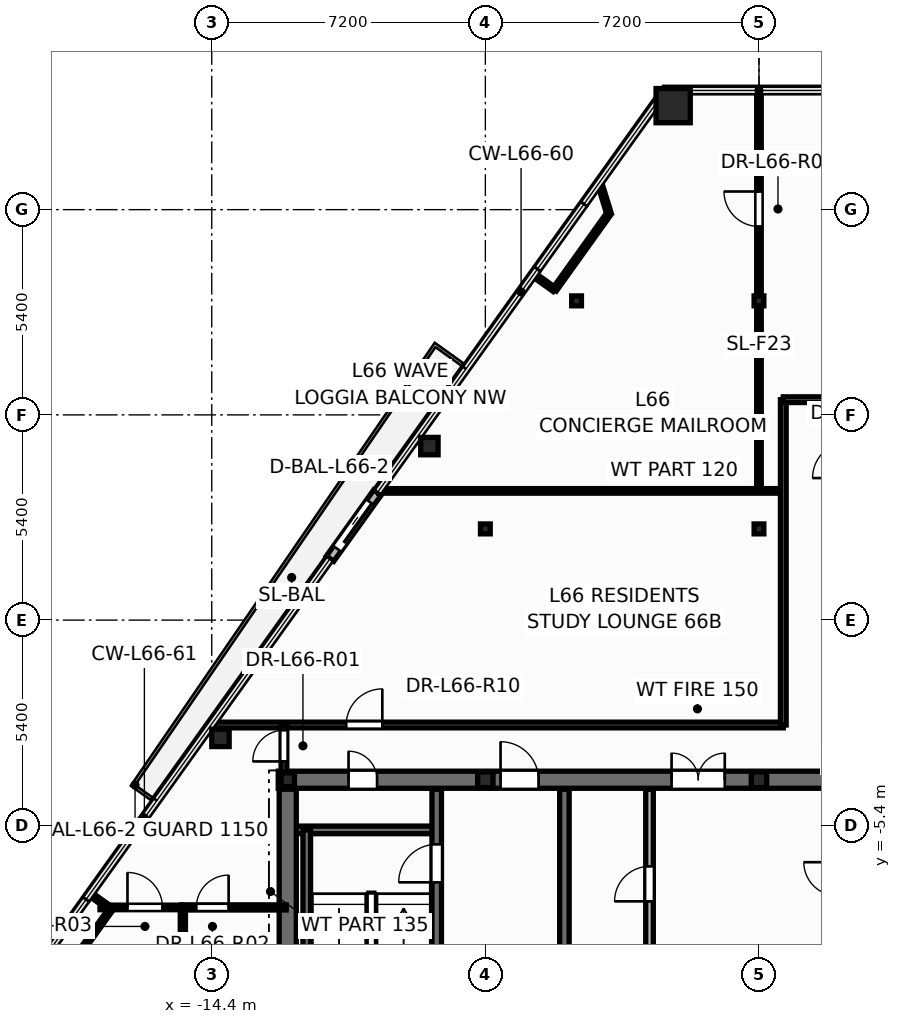
"""IFC4 building model, lengths in metres.
Left out: names, types, materials, properties, quantities, classifications, styles, units other than length and angle.
Written with IfcOpenShell. Run it as: python <this file> out.ifc"""

import sys

from ifc_helpers import new_model, si_unit, direction, frame, frame_2d, origin, origin_2d, place, context, subcontext, project, spatial, rectangle, hollow_rectangle, hollow_circle, i_section, extrude, element, fill, save


model = new_model("IFC4")
c1 = context("Model", 3, precision=1e-05, world=origin(), true_north=direction((0.0, 1.0)))
c2 = subcontext(c1, "Body", "Model", "MODEL_VIEW")
j1 = project(units=[si_unit("LENGTHUNIT", "METRE"), si_unit("PLANEANGLEUNIT", "RADIAN")], contexts=[c1])
p1 = place(None, origin())
s1 = spatial("IfcSite", under=j1, at=p1, CompositionType="ELEMENT")
p2 = place(p1, origin())
s2 = spatial("IfcBuilding", under=s1, at=p2, CompositionType="ELEMENT")
p3 = place(p2, frame((0.0, 0.0, 252.6)))
s3 = spatial("IfcBuildingStorey", under=s2, at=p3, CompositionType="ELEMENT", Elevation=252.6)
p4 = place(p3, frame((-2.258, 13.537, 0.0), z_axis=(0.0, 0.0, 1.0), x_axis=(1.0, 0.0, 0.0)))
e1 = element("IfcColumn", 1, at=p4, inside=s3, PredefinedType="COLUMN", context=c2, shape_type="SweptSolid", body=[
    extrude(hollow_rectangle(XDim=0.9, YDim=0.9, WallThickness=0.04, at=origin_2d()), origin(), (0.0, 0.0, 1.0), 3.6),
])
for number, where, z_axis, x_axis in (
    (2, (-8.673, 4.579, 0.0), (0.0, 0.0, 1.0), (1.0, 0.0, 0.0)),
    (3, (-14.171, -3.099, 0.0), (0.0, 0.0, 1.0), (1.0, 0.0, 0.0)),
):
    element("IfcColumn", number, at=place(p3, frame(where, z_axis=z_axis, x_axis=x_axis)), inside=s3, PredefinedType="COLUMN", context=c2, shape_type="SweptSolid", body=[
        extrude(hollow_circle(Radius=0.229, WallThickness=0.016, at=origin_2d()), origin(), (0.0, 0.0, 1.0), 3.6),
    ])
p5 = place(p3, frame((-12.4, -4.2, 0.0), z_axis=(0.0, 0.0, 1.0), x_axis=(1.0, 0.0, 0.0)))
e4 = element("IfcColumn", 4, at=p5, inside=s3, PredefinedType="COLUMN", context=c2, shape_type="SweptSolid", body=[
    extrude(i_section(OverallWidth=0.352, OverallDepth=0.359, WebThickness=0.018, FlangeThickness=0.026, at=origin_2d()), origin(), (0.0, 0.0, 1.0), 3.6),
])
for number, where, z_axis, x_axis in (
    (5, (-7.2, -4.2, 0.0), (0.0, 0.0, 1.0), (1.0, 0.0, 0.0)),
    (6, (0.0, -4.2, 0.0), (0.0, 0.0, 1.0), (1.0, 0.0, 0.0)),
):
    element("IfcColumn", number, at=place(p3, frame(where, z_axis=z_axis, x_axis=x_axis)), inside=s3, PredefinedType="PILASTER", context=c2, shape_type="SweptSolid", body=[
        extrude(i_section(OverallWidth=0.405, OverallDepth=0.414, WebThickness=0.022, FlangeThickness=0.032, at=origin_2d()), origin(), (0.0, 0.0, 1.0), 3.6),
    ])
for number, where, z_axis, x_axis in (
    (7, (-7.2, 2.4, 0.0), (0.0, 0.0, 1.0), (1.0, 0.0, 0.0)),
    (8, (0.0, 2.4, 0.0), (0.0, 0.0, 1.0), (1.0, 0.0, 0.0)),
    (9, (-4.8, 8.4, 0.0), (0.0, 0.0, 1.0), (1.0, 0.0, 0.0)),
    (10, (0.0, 8.4, 0.0), (0.0, 0.0, 1.0), (1.0, 0.0, 0.0)),
):
    element("IfcColumn", number, at=place(p3, frame(where, z_axis=z_axis, x_axis=x_axis)), inside=s3, PredefinedType="COLUMN", context=c2, shape_type="SweptSolid", body=[
        extrude(i_section(OverallWidth=0.256, OverallDepth=0.26, WebThickness=0.01, FlangeThickness=0.017, at=origin_2d()), origin(), (0.0, 0.0, 1.0), 3.6),
    ])
p6 = place(p3, frame((-10.039, 3.357, -0.015), z_axis=(0.0, 0.0, 1.0), x_axis=(-0.58216589686, -0.813070026832, 0.0)))
e11 = element("IfcWall", 11, at=p6, inside=s3, PredefinedType="STANDARD", context=c2, shape_type="SweptSolid", body=[
    extrude(rectangle(XDim=2.14, YDim=0.24, at=frame_2d((1.07, 0.0))), origin(), (0.0, 0.0, 1.0), 2.878),
])
p7 = place(p6, frame((0.32, 0.0, 0.015)))
e12 = element("IfcOpeningElement", 12, at=p7, cuts=e11, PredefinedType="OPENING", context=c2, shape_type="SweptSolid", body=[
    extrude(rectangle(XDim=1.506, YDim=2.204, at=frame_2d((0.75, 1.102))), frame((0.0, 0.13, 0.0), z_axis=(0.0, -1.0, 0.0), x_axis=(1.0, 0.0, 0.0)), (0.0, 0.0, 1.0), 0.26),
])
p8 = place(p3, frame((-12.65, -4.2, 0.0), z_axis=(0.0, 0.0, 1.0), x_axis=(1.0, 0.0, 0.0)))
e13 = element("IfcWall", 13, at=p8, inside=s3, PredefinedType="SHEAR", context=c2, shape_type="SweptSolid", body=[
    extrude(rectangle(XDim=25.3, YDim=0.45, at=frame_2d((12.65, 0.0))), origin(), (0.0, 0.0, 1.0), 3.6),
])
p9 = place(p8, frame((1.85, 0.0, 0.0)))
e14 = element("IfcOpeningElement", 14, at=p9, cuts=e13, PredefinedType="OPENING", context=c2, shape_type="SweptSolid", body=[
    extrude(rectangle(XDim=0.756, YDim=2.054, at=frame_2d((0.375, 1.027))), frame((0.0, 0.235, 0.0), z_axis=(0.0, -1.0, 0.0), x_axis=(1.0, 0.0, 0.0)), (0.0, 0.0, 1.0), 0.47),
])
p10 = place(p8, frame((22.65, 0.0, 0.0)))
e15 = element("IfcOpeningElement", 15, at=p10, cuts=e13, PredefinedType="OPENING", context=c2, shape_type="SweptSolid", body=[
    extrude(rectangle(XDim=0.756, YDim=2.054, at=frame_2d((0.375, 1.027))), frame((0.0, 0.235, 0.0), z_axis=(0.0, -1.0, 0.0), x_axis=(1.0, 0.0, 0.0)), (0.0, 0.0, 1.0), 0.47),
])
p11 = place(p8, frame((5.85, 0.0, 0.0)))
e16 = element("IfcOpeningElement", 16, at=p11, cuts=e13, PredefinedType="OPENING", context=c2, shape_type="SweptSolid", body=[
    extrude(rectangle(XDim=1.006, YDim=2.104, at=frame_2d((0.5, 1.052))), frame((0.0, 0.235, 0.0), z_axis=(0.0, -1.0, 0.0), x_axis=(1.0, 0.0, 0.0)), (0.0, 0.0, 1.0), 0.47),
])
p12 = place(p8, frame((10.35, 0.0, 0.0)))
e17 = element("IfcOpeningElement", 17, at=p12, cuts=e13, PredefinedType="OPENING", context=c2, shape_type="SweptSolid", body=[
    extrude(rectangle(XDim=1.406, YDim=2.154, at=frame_2d((0.7, 1.077))), frame((0.0, 0.235, 0.0), z_axis=(0.0, -1.0, 0.0), x_axis=(1.0, 0.0, 0.0)), (0.0, 0.0, 1.0), 0.47),
])
p13 = place(p8, frame((18.45, 0.0, 0.0)))
e18 = element("IfcOpeningElement", 18, at=p13, cuts=e13, PredefinedType="OPENING", context=c2, shape_type="SweptSolid", body=[
    extrude(rectangle(XDim=1.006, YDim=2.104, at=frame_2d((0.5, 1.052))), frame((0.0, 0.235, 0.0), z_axis=(0.0, -1.0, 0.0), x_axis=(1.0, 0.0, 0.0)), (0.0, 0.0, 1.0), 0.47),
])
p14 = place(p3, frame((-12.35, -5.52, 0.0), z_axis=(0.0, 0.0, 1.0), x_axis=(1.0, 0.0, 0.0)))
e19 = element("IfcWall", 19, at=p14, inside=s3, PredefinedType="SOLIDWALL", context=c2, shape_type="SweptSolid", body=[
    extrude(rectangle(XDim=3.87, YDim=0.2, at=frame_2d((1.935, 0.0))), origin(), (0.0, 0.0, 1.0), 3.6),
])
p15 = place(p3, frame((-11.9, -13.1, 0.0), z_axis=(0.0, 0.0, 1.0), x_axis=(0.0, 1.0, 0.0)))
e20 = element("IfcWall", 20, at=p15, inside=s3, PredefinedType="SOLIDWALL", context=c2, shape_type="SweptSolid", body=[
    extrude(rectangle(XDim=7.58, YDim=0.2, at=frame_2d((3.79, 0.0))), origin(), (0.0, 0.0, 1.0), 3.6),
])
p16 = place(p3, frame((-8.48, -13.85, 0.0), z_axis=(0.0, 0.0, 1.0), x_axis=(0.0, 1.0, 0.0)))
e21 = element("IfcWall", 21, at=p16, inside=s3, PredefinedType="SHEAR", context=c2, shape_type="SweptSolid", body=[
    extrude(rectangle(XDim=9.4, YDim=0.25, at=frame_2d((4.7, 0.0))), origin(), (0.0, 0.0, 1.0), 3.6),
])
p17 = place(p16, frame((6.95, 0.0, 0.0)))
e22 = element("IfcOpeningElement", 22, at=p17, cuts=e21, PredefinedType="OPENING", context=c2, shape_type="SweptSolid", body=[
    extrude(rectangle(XDim=1.006, YDim=2.104, at=frame_2d((0.5, 1.052))), frame((0.0, 0.135, 0.0), z_axis=(0.0, -1.0, 0.0), x_axis=(1.0, 0.0, 0.0)), (0.0, 0.0, 1.0), 0.27),
])
p18 = place(p3, frame((-5.12, -13.85, 0.0), z_axis=(0.0, 0.0, 1.0), x_axis=(0.0, 1.0, 0.0)))
e23 = element("IfcWall", 23, at=p18, inside=s3, PredefinedType="SHEAR", context=c2, shape_type="SweptSolid", body=[
    extrude(rectangle(XDim=9.4, YDim=0.25, at=frame_2d((4.7, 0.0))), origin(), (0.0, 0.0, 1.0), 3.6),
])
p19 = place(p3, frame((-12.4, -13.85, 0.0), z_axis=(0.0, 0.0, 1.0), x_axis=(0.0, 1.0, 0.0)))
e24 = element("IfcWall", 24, at=p19, inside=s3, PredefinedType="SHEAR", context=c2, shape_type="SweptSolid", body=[
    extrude(rectangle(XDim=9.4, YDim=0.45, at=frame_2d((4.7, 0.0))), origin(), (0.0, 0.0, 1.0), 3.6),
])
p20 = place(p3, frame((-2.88, -9.45, 0.0), z_axis=(0.0, 0.0, 1.0), x_axis=(0.0, 1.0, 0.0)))
e25 = element("IfcWall", 25, at=p20, inside=s3, PredefinedType="SOLIDWALL", context=c2, shape_type="SweptSolid", body=[
    extrude(rectangle(XDim=5.0, YDim=0.2, at=frame_2d((2.5, 0.0))), origin(), (0.0, 0.0, 1.0), 3.345),
])
p21 = place(p20, frame((2.05, 0.0, 0.0)))
e26 = element("IfcOpeningElement", 26, at=p21, cuts=e25, PredefinedType="OPENING", context=c2, shape_type="SweptSolid", body=[
    extrude(rectangle(XDim=0.926, YDim=2.104, at=frame_2d((0.46, 1.052))), frame((0.0, 0.11, 0.0), z_axis=(0.0, -1.0, 0.0), x_axis=(1.0, 0.0, 0.0)), (0.0, 0.0, 1.0), 0.22),
])
p22 = place(p3, frame((-14.42, -2.76, 0.0), z_axis=(0.0, 0.0, 1.0), x_axis=(1.0, 0.0, 0.0)))
e27 = element("IfcWall", 27, at=p22, inside=s3, PredefinedType="PARTITIONING", context=c2, shape_type="SweptSolid", body=[
    extrude(rectangle(XDim=15.06, YDim=0.15, at=frame_2d((7.53, 0.0))), origin(), (0.0, 0.0, 1.0), 2.32),
])
p23 = place(p22, frame((3.559, 0.0, 0.0)))
e28 = element("IfcOpeningElement", 28, at=p23, cuts=e27, PredefinedType="OPENING", context=c2, shape_type="SweptSolid", body=[
    extrude(rectangle(XDim=0.956, YDim=2.104, at=frame_2d((0.475, 1.052))), frame((0.0, 0.085, 0.0), z_axis=(0.0, -1.0, 0.0), x_axis=(1.0, 0.0, 0.0)), (0.0, 0.0, 1.0), 0.17),
])
p24 = place(p3, frame((0.0, 3.4, 0.0), z_axis=(0.0, 0.0, 1.0), x_axis=(0.0, 1.0, 0.0)))
e29 = element("IfcWall", 29, at=p24, inside=s3, PredefinedType="PARTITIONING", context=c2, shape_type="SweptSolid", body=[
    extrude(rectangle(XDim=10.537, YDim=0.12, at=frame_2d((5.269, 0.0))), origin(), (0.0, 0.0, 1.0), 2.32),
])
p25 = place(p24, frame((6.958, 0.0, 0.0)))
e30 = element("IfcOpeningElement", 30, at=p25, cuts=e29, PredefinedType="OPENING", context=c2, shape_type="SweptSolid", body=[
    extrude(rectangle(XDim=0.926, YDim=2.104, at=frame_2d((0.46, 1.052))), frame((0.0, 0.07, 0.0), z_axis=(0.0, -1.0, 0.0), x_axis=(1.0, 0.0, 0.0)), (0.0, 0.0, 1.0), 0.14),
])
p26 = place(p3, frame((-10.009, 3.4, 0.0), z_axis=(0.0, 0.0, 1.0), x_axis=(1.0, 0.0, 0.0)))
e31 = element("IfcWall", 31, at=p26, inside=s3, PredefinedType="PARTITIONING", context=c2, shape_type="SweptSolid", body=[
    extrude(rectangle(XDim=10.649, YDim=0.12, at=frame_2d((5.324, 0.0))), origin(), (0.0, 0.0, 1.0), 2.32),
])
p27 = place(p3, frame((0.64, -2.76, 0.0), z_axis=(0.0, 0.0, 1.0), x_axis=(0.0, 1.0, 0.0)))
e32 = element("IfcWall", 32, at=p27, inside=s3, PredefinedType="PARTITIONING", context=c2, shape_type="SweptSolid", body=[
    extrude(rectangle(XDim=8.56, YDim=0.15, at=frame_2d((4.28, 0.0))), origin(), (0.0, 0.0, 1.0), 2.32),
])
p28 = place(p3, frame((-15.2, -7.56, 0.0), z_axis=(0.0, 0.0, 1.0), x_axis=(1.0, 0.0, 0.0)))
e33 = element("IfcWall", 33, at=p28, inside=s3, PredefinedType="PARTITIONING", context=c2, shape_type="SweptSolid", body=[
    extrude(rectangle(XDim=2.76, YDim=0.135, at=frame_2d((1.38, 0.0))), origin(), (0.0, 0.0, 1.0), 2.863),
])
p29 = place(p28, frame((0.394, 0.0, 0.0)))
e34 = element("IfcOpeningElement", 34, at=p29, cuts=e33, PredefinedType="OPENING", context=c2, shape_type="SweptSolid", body=[
    extrude(rectangle(XDim=0.856, YDim=2.104, at=frame_2d((0.425, 1.052))), frame((0.0, 0.078, 0.0), z_axis=(0.0, -1.0, 0.0), x_axis=(1.0, 0.0, 0.0)), (0.0, 0.0, 1.0), 0.155),
])
p30 = place(p3, frame((-15.16, -10.3, 0.0), z_axis=(0.0, 0.0, 1.0), x_axis=(0.0, 1.0, 0.0)))
e35 = element("IfcWall", 35, at=p30, inside=s3, PredefinedType="PARTITIONING", context=c2, shape_type="SweptSolid", body=[
    extrude(rectangle(XDim=2.74, YDim=0.135, at=frame_2d((1.37, 0.0))), origin(), (0.0, 0.0, 1.0), 3.345),
])
p31 = place(p3, frame((-3.948, 10.696, 0.0), z_axis=(0.0, 0.0, 1.0), x_axis=(-0.582269881882, -0.812995562505, 0.0)))
e36 = element("IfcWall", 36, at=p31, inside=s3, PredefinedType="PARTITIONING", context=c2, shape_type="SweptSolid", body=[
    extrude(rectangle(XDim=2.461, YDim=0.12, at=frame_2d((1.23, 0.0))), origin(), (0.0, 0.0, 1.0), 3.345),
])
p32 = place(p3, frame((-17.05, -7.601, 0.0), z_axis=(0.0, 0.0, 1.0), x_axis=(-0.582222927872, -0.813029189058, 0.0)))
e37 = element("IfcWall", 37, at=p32, inside=s3, PredefinedType="PARTITIONING", context=c2, shape_type="SweptSolid", body=[
    extrude(rectangle(XDim=2.461, YDim=0.12, at=frame_2d((1.231, 0.0))), origin(), (0.0, 0.0, 1.0), 3.345),
])
p33 = place(p3, frame((-17.34, -7.56, 0.0), z_axis=(0.0, 0.0, 1.0), x_axis=(1.0, 0.0, 0.0)))
e38 = element("IfcWall", 38, at=p33, inside=s3, PredefinedType="PARTITIONING", context=c2, shape_type="SweptSolid", body=[
    extrude(rectangle(XDim=2.138, YDim=0.12, at=frame_2d((1.069, 0.0))), origin(), (0.0, 0.0, 1.0), 2.32),
])
p34 = place(p33, frame((0.723, 0.0, 0.0)))
e39 = element("IfcOpeningElement", 39, at=p34, cuts=e38, PredefinedType="OPENING", context=c2, shape_type="SweptSolid", body=[
    extrude(rectangle(XDim=0.926, YDim=2.104, at=frame_2d((0.46, 1.052))), frame((0.0, 0.07, 0.0), z_axis=(0.0, -1.0, 0.0), x_axis=(1.0, 0.0, 0.0)), (0.0, 0.0, 1.0), 0.14),
])
p35 = place(p3, frame((0.64, 5.8, 0.0), z_axis=(0.0, 0.0, 1.0), x_axis=(1.0, 0.0, 0.0)))
e40 = element("IfcWall", 40, at=p35, inside=s3, PredefinedType="PARTITIONING", context=c2, shape_type="SweptSolid", body=[
    extrude(rectangle(XDim=1.72, YDim=0.15, at=frame_2d((0.86, 0.0))), origin(), (0.0, 0.0, 1.0), 2.964),
])
p36 = place(p3, frame((-12.5, -4.24, 0.0), z_axis=(0.0, 0.0, 1.0), x_axis=(0.0, 1.0, 0.0)))
e41 = element("IfcWall", 41, at=p36, inside=s3, PredefinedType="PARTITIONING", context=c2, shape_type="SweptSolid", body=[
    extrude(rectangle(XDim=1.48, YDim=0.15, at=frame_2d((0.74, 0.0))), origin(), (0.0, 0.0, 1.0), 2.32),
])
p37 = place(p36, frame((0.522, 0.0, 0.0)))
e42 = element("IfcOpeningElement", 42, at=p37, cuts=e41, PredefinedType="OPENING", context=c2, shape_type="SweptSolid", body=[
    extrude(rectangle(XDim=0.826, YDim=2.104, at=frame_2d((0.41, 1.052))), frame((0.0, 0.085, 0.0), z_axis=(0.0, -1.0, 0.0), x_axis=(1.0, 0.0, 0.0)), (0.0, 0.0, 1.0), 0.17),
])
p38 = place(p3, frame((-4.195, 11.501, 0.0), z_axis=(0.0, 0.0, 1.0), x_axis=(0.294146941198, -0.955760208935, 0.0)))
e43 = element("IfcWall", 43, at=p38, inside=s3, PredefinedType="PARTITIONING", context=c2, shape_type="SweptSolid", body=[
    extrude(rectangle(XDim=0.843, YDim=0.12, at=frame_2d((0.421, 0.0))), origin(), (0.0, 0.0, 1.0), 2.863),
])
for number, where, z_axis, x_axis in (
    (44, (-17.594, -7.211, 0.0), (0.0, 0.0, 1.0), (0.813, -0.582, 0.0)),
    (45, (-5.381, 8.695, 0.0), (0.0, 0.0, 1.0), (-0.813, 0.582, 0.0)),
):
    element("IfcWall", number, at=place(p3, frame(where, z_axis=z_axis, x_axis=x_axis)), inside=s3, PredefinedType="PARTITIONING", context=c2, shape_type="SweptSolid", body=[
        extrude(rectangle(XDim=0.67, YDim=0.12, at=frame_2d((0.335, 0.0))), origin(), (0.0, 0.0, 1.0), 2.863),
    ])
p39 = place(p7, origin())
e46 = element("IfcDoor", 46, at=p39, inside=s3, OperationType="SLIDING_TO_RIGHT", PredefinedType="DOOR", context=c2, shape_type="SweptSolid", body=[
    extrude(rectangle(XDim=1.5, YDim=2.2, at=frame_2d((0.75, 1.1))), frame((0.0, 0.025, 0.0), z_axis=(0.0, -1.0, 0.0), x_axis=(1.0, 0.0, 0.0)), (0.0, 0.0, 1.0), 0.05),
])
fill(e12, e46)
p40 = place(p21, origin())
e47 = element("IfcDoor", 47, at=p40, inside=s3, OperationType="SINGLE_SWING_LEFT", PredefinedType="DOOR", context=c2, shape_type="SweptSolid", body=[
    extrude(rectangle(XDim=0.92, YDim=2.1, at=frame_2d((0.46, 1.05))), frame((0.0, 0.025, 0.0), z_axis=(0.0, -1.0, 0.0), x_axis=(1.0, 0.0, 0.0)), (0.0, 0.0, 1.0), 0.05),
])
fill(e26, e47)
p41 = place(p17, origin())
e48 = element("IfcDoor", 48, at=p41, inside=s3, OperationType="SINGLE_SWING_LEFT", PredefinedType="DOOR", context=c2, shape_type="SweptSolid", body=[
    extrude(rectangle(XDim=1.0, YDim=2.1, at=frame_2d((0.5, 1.05))), frame((0.0, 0.025, 0.0), z_axis=(0.0, -1.0, 0.0), x_axis=(1.0, 0.0, 0.0)), (0.0, 0.0, 1.0), 0.05),
])
fill(e22, e48)
p42 = place(p9, origin())
e49 = element("IfcDoor", 49, at=p42, inside=s3, OperationType="SINGLE_SWING_LEFT", PredefinedType="DOOR", context=c2, shape_type="SweptSolid", body=[
    extrude(rectangle(XDim=0.75, YDim=2.05, at=frame_2d((0.375, 1.025))), frame((0.0, 0.025, 0.0), z_axis=(0.0, -1.0, 0.0), x_axis=(1.0, 0.0, 0.0)), (0.0, 0.0, 1.0), 0.05),
])
fill(e14, e49)
p43 = place(p11, origin())
e50 = element("IfcDoor", 50, at=p43, inside=s3, OperationType="SINGLE_SWING_LEFT", PredefinedType="DOOR", context=c2, shape_type="SweptSolid", body=[
    extrude(rectangle(XDim=1.0, YDim=2.1, at=frame_2d((0.5, 1.05))), frame((0.0, 0.025, 0.0), z_axis=(0.0, -1.0, 0.0), x_axis=(1.0, 0.0, 0.0)), (0.0, 0.0, 1.0), 0.05),
])
fill(e16, e50)
p44 = place(p12, origin())
e51 = element("IfcDoor", 51, at=p44, inside=s3, OperationType="DOUBLE_DOOR_SINGLE_SWING", PredefinedType="DOOR", context=c2, shape_type="SweptSolid", body=[
    extrude(rectangle(XDim=1.4, YDim=2.15, at=frame_2d((0.7, 1.075))), frame((0.0, 0.025, 0.0), z_axis=(0.0, -1.0, 0.0), x_axis=(1.0, 0.0, 0.0)), (0.0, 0.0, 1.0), 0.05),
])
fill(e17, e51)
p45 = place(p37, origin())
e52 = element("IfcDoor", 52, at=p45, inside=s3, OperationType="SINGLE_SWING_LEFT", PredefinedType="DOOR", context=c2, shape_type="SweptSolid", body=[
    extrude(rectangle(XDim=0.82, YDim=2.1, at=frame_2d((0.41, 1.05))), frame((0.0, 0.025, 0.0), z_axis=(0.0, -1.0, 0.0), x_axis=(1.0, 0.0, 0.0)), (0.0, 0.0, 1.0), 0.05),
])
fill(e42, e52)
p46 = place(p29, origin())
e53 = element("IfcDoor", 53, at=p46, inside=s3, OperationType="SINGLE_SWING_RIGHT", PredefinedType="DOOR", context=c2, shape_type="SweptSolid", body=[
    extrude(rectangle(XDim=0.85, YDim=2.1, at=frame_2d((0.425, 1.05))), frame((0.0, 0.025, 0.0), z_axis=(0.0, -1.0, 0.0), x_axis=(1.0, 0.0, 0.0)), (0.0, 0.0, 1.0), 0.05),
])
fill(e34, e53)
p47 = place(p34, origin())
e54 = element("IfcDoor", 54, at=p47, inside=s3, OperationType="SINGLE_SWING_LEFT", PredefinedType="DOOR", context=c2, shape_type="SweptSolid", body=[
    extrude(rectangle(XDim=0.92, YDim=2.1, at=frame_2d((0.46, 1.05))), frame((0.0, 0.025, 0.0), z_axis=(0.0, -1.0, 0.0), x_axis=(1.0, 0.0, 0.0)), (0.0, 0.0, 1.0), 0.05),
])
fill(e39, e54)
p48 = place(p25, origin())
e55 = element("IfcDoor", 55, at=p48, inside=s3, OperationType="SINGLE_SWING_RIGHT", PredefinedType="DOOR", context=c2, shape_type="SweptSolid", body=[
    extrude(rectangle(XDim=0.92, YDim=2.1, at=frame_2d((0.46, 1.05))), frame((0.0, 0.025, 0.0), z_axis=(0.0, -1.0, 0.0), x_axis=(1.0, 0.0, 0.0)), (0.0, 0.0, 1.0), 0.05),
])
fill(e30, e55)
p49 = place(p23, origin())
e56 = element("IfcDoor", 56, at=p49, inside=s3, OperationType="SINGLE_SWING_RIGHT", PredefinedType="DOOR", context=c2, shape_type="SweptSolid", body=[
    extrude(rectangle(XDim=0.95, YDim=2.1, at=frame_2d((0.475, 1.05))), frame((0.0, 0.025, 0.0), z_axis=(0.0, -1.0, 0.0), x_axis=(1.0, 0.0, 0.0)), (0.0, 0.0, 1.0), 0.05),
])
fill(e28, e56)
save(model, sys.argv[1])
